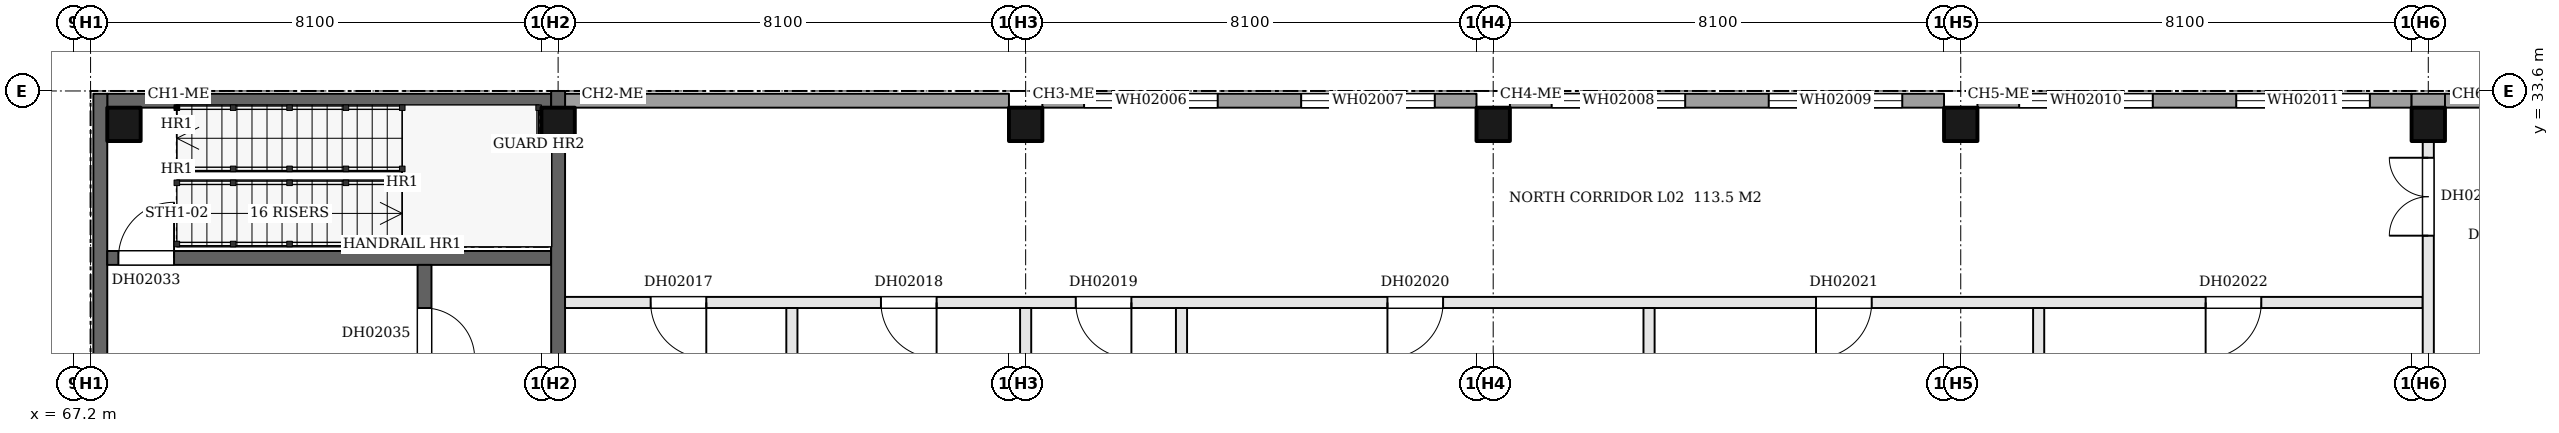
"""IFC4 building model, lengths in metres.
Left out: names, types, materials, properties, quantities, classifications, styles, units other than length and angle.
Written with IfcOpenShell. Run it as: python <this file> out.ifc"""

import sys

from ifc_helpers import new_model, si_unit, direction, frame, frame_2d, origin, origin_2d, place, context, subcontext, project, spatial, rectangle, extrude, element, fill, save


model = new_model("IFC4")
c1 = context("Model", 3, precision=1e-05, world=origin(), true_north=direction((0.0, 1.0)))
c2 = subcontext(c1, "Body", "Model", "MODEL_VIEW")
j1 = project(units=[si_unit("LENGTHUNIT", "METRE"), si_unit("PLANEANGLEUNIT", "RADIAN")], contexts=[c1])
p1 = place(None, origin())
s1 = spatial("IfcSite", under=j1, at=p1, CompositionType="ELEMENT")
p2 = place(p1, origin())
s2 = spatial("IfcBuilding", under=s1, at=p2, CompositionType="ELEMENT")
p3 = place(p2, frame((0.0, 0.0, 14.4)))
s3 = spatial("IfcBuildingStorey", under=s2, at=p3, CompositionType="ELEMENT", Elevation=14.4)
for number, where, z_axis, x_axis in (
    (1, (68.1, 33.0, 0.0), (0.0, 0.0, 1.0), (1.0, 0.0, 0.0)),
    (2, (75.9, 33.0, 0.0), (0.0, 0.0, 1.0), (1.0, 0.0, 0.0)),
    (3, (84.3, 33.0, 0.0), (0.0, 0.0, 1.0), (1.0, 0.0, 0.0)),
    (4, (92.7, 33.0, 0.0), (0.0, 0.0, 1.0), (1.0, 0.0, 0.0)),
    (5, (101.1, 33.0, 0.0), (0.0, 0.0, 1.0), (1.0, 0.0, 0.0)),
    (6, (109.5, 33.0, 0.0), (0.0, 0.0, 1.0), (1.0, 0.0, 0.0)),
):
    element("IfcColumn", number, at=place(p3, frame(where, z_axis=z_axis, x_axis=x_axis)), inside=s3, PredefinedType="COLUMN", context=c2, shape_type="SweptSolid", body=[
        extrude(rectangle(XDim=0.6, YDim=0.6, at=origin_2d()), origin(), (0.0, 0.0, 1.0), 5.1),
    ])
p4 = place(p3, frame((76.025, 29.8, 0.0), z_axis=(0.0, 0.0, 1.0), x_axis=(1.0, 0.0, 0.0)))
e7 = element("IfcWall", 7, at=p4, inside=s3, PredefinedType="PARTITIONING", context=c2, shape_type="SweptSolid", body=[
    extrude(rectangle(XDim=33.375, YDim=0.2, at=frame_2d((16.688, 0.0))), origin(), (0.0, 0.0, 1.0), 5.1),
])
p5 = place(p4, frame((1.538, 0.0, 0.0)))
e8 = element("IfcOpeningElement", 8, at=p5, cuts=e7, PredefinedType="OPENING", context=c2, shape_type="SweptSolid", body=[
    extrude(rectangle(XDim=1.0, YDim=2.1, at=frame_2d((0.5, 1.05))), frame((0.0, 0.11, 0.0), z_axis=(0.0, -1.0, 0.0), x_axis=(1.0, 0.0, 0.0)), (0.0, 0.0, 1.0), 0.22),
])
p6 = place(p4, frame((5.675, 0.0, 0.0)))
e9 = element("IfcOpeningElement", 9, at=p6, cuts=e7, PredefinedType="OPENING", context=c2, shape_type="SweptSolid", body=[
    extrude(rectangle(XDim=1.0, YDim=2.1, at=frame_2d((0.5, 1.05))), frame((0.0, 0.11, 0.0), z_axis=(0.0, -1.0, 0.0), x_axis=(1.0, 0.0, 0.0)), (0.0, 0.0, 1.0), 0.22),
])
p7 = place(p4, frame((9.175, 0.0, 0.0)))
e10 = element("IfcOpeningElement", 10, at=p7, cuts=e7, PredefinedType="OPENING", context=c2, shape_type="SweptSolid", body=[
    extrude(rectangle(XDim=1.0, YDim=2.1, at=frame_2d((0.5, 1.05))), frame((0.0, 0.11, 0.0), z_axis=(0.0, -1.0, 0.0), x_axis=(1.0, 0.0, 0.0)), (0.0, 0.0, 1.0), 0.22),
])
p8 = place(p4, frame((14.775, 0.0, 0.0)))
e11 = element("IfcOpeningElement", 11, at=p8, cuts=e7, PredefinedType="OPENING", context=c2, shape_type="SweptSolid", body=[
    extrude(rectangle(XDim=1.0, YDim=2.1, at=frame_2d((0.5, 1.05))), frame((0.0, 0.11, 0.0), z_axis=(0.0, -1.0, 0.0), x_axis=(1.0, 0.0, 0.0)), (0.0, 0.0, 1.0), 0.22),
])
p9 = place(p4, frame((22.475, 0.0, 0.0)))
e12 = element("IfcOpeningElement", 12, at=p9, cuts=e7, PredefinedType="OPENING", context=c2, shape_type="SweptSolid", body=[
    extrude(rectangle(XDim=1.0, YDim=2.1, at=frame_2d((0.5, 1.05))), frame((0.0, 0.11, 0.0), z_axis=(0.0, -1.0, 0.0), x_axis=(1.0, 0.0, 0.0)), (0.0, 0.0, 1.0), 0.22),
])
p10 = place(p4, frame((29.475, 0.0, 0.0)))
e13 = element("IfcOpeningElement", 13, at=p10, cuts=e7, PredefinedType="OPENING", context=c2, shape_type="SweptSolid", body=[
    extrude(rectangle(XDim=1.0, YDim=2.1, at=frame_2d((0.5, 1.05))), frame((0.0, 0.11, 0.0), z_axis=(0.0, -1.0, 0.0), x_axis=(1.0, 0.0, 0.0)), (0.0, 0.0, 1.0), 0.22),
])
p11 = place(p3, frame((67.8, 30.6, 0.0), z_axis=(0.0, 0.0, 1.0), x_axis=(1.0, 0.0, 0.0)))
e14 = element("IfcWall", 14, at=p11, inside=s3, PredefinedType="SHEAR", context=c2, shape_type="SweptSolid", body=[
    extrude(rectangle(XDim=7.975, YDim=0.25, at=frame_2d((3.987, 0.0))), origin(), (0.0, 0.0, 1.0), 5.1),
])
p12 = place(p11, frame((0.2, 0.0, 0.0)))
e15 = element("IfcOpeningElement", 15, at=p12, cuts=e14, PredefinedType="OPENING", context=c2, shape_type="SweptSolid", body=[
    extrude(rectangle(XDim=1.0, YDim=2.1, at=frame_2d((0.5, 1.05))), frame((0.0, 0.135, 0.0), z_axis=(0.0, -1.0, 0.0), x_axis=(1.0, 0.0, 0.0)), (0.0, 0.0, 1.0), 0.27),
])
p13 = place(p3, frame((67.8, 33.425, 0.0), z_axis=(0.0, 0.0, 1.0), x_axis=(1.0, 0.0, 0.0)))
e16 = element("IfcWall", 16, at=p13, inside=s3, PredefinedType="SHEAR", context=c2, shape_type="SweptSolid", body=[
    extrude(rectangle(XDim=7.975, YDim=0.25, at=frame_2d((3.987, 0.0))), origin(), (0.0, 0.0, 1.0), 5.1),
])
p14 = place(p3, frame((76.025, 33.425, 0.0), z_axis=(0.0, 0.0, 1.0), x_axis=(1.0, 0.0, 0.0)))
e17 = element("IfcWall", 17, at=p14, inside=s3, PredefinedType="SOLIDWALL", context=c2, shape_type="SweptSolid", body=[
    extrude(rectangle(XDim=7.975, YDim=0.25, at=frame_2d((3.988, 0.0))), origin(), (0.0, 0.0, 1.0), 5.1),
])
p15 = place(p3, frame((84.6, 33.425, 0.0), z_axis=(0.0, 0.0, 1.0), x_axis=(1.0, 0.0, 0.0)))
e18 = element("IfcWall", 18, at=p15, inside=s3, PredefinedType="SOLIDWALL", context=c2, shape_type="SweptSolid", body=[
    extrude(rectangle(XDim=7.8, YDim=0.25, at=frame_2d((3.9, 0.0))), origin(), (0.0, 0.0, 1.0), 5.1),
])
p16 = place(p15, frame((0.75, 0.0, 0.9)))
e19 = element("IfcOpeningElement", 19, at=p16, cuts=e18, PredefinedType="OPENING", context=c2, shape_type="SweptSolid", body=[
    extrude(rectangle(XDim=2.4, YDim=1.5, at=frame_2d((1.2, 0.75))), frame((0.0, 0.135, 0.0), z_axis=(0.0, -1.0, 0.0), x_axis=(1.0, 0.0, 0.0)), (0.0, 0.0, 1.0), 0.27),
])
p17 = place(p15, frame((4.65, 0.0, 0.9)))
e20 = element("IfcOpeningElement", 20, at=p17, cuts=e18, PredefinedType="OPENING", context=c2, shape_type="SweptSolid", body=[
    extrude(rectangle(XDim=2.4, YDim=1.5, at=frame_2d((1.2, 0.75))), frame((0.0, 0.135, 0.0), z_axis=(0.0, -1.0, 0.0), x_axis=(1.0, 0.0, 0.0)), (0.0, 0.0, 1.0), 0.27),
])
p18 = place(p3, frame((93.0, 33.425, 0.0), z_axis=(0.0, 0.0, 1.0), x_axis=(1.0, 0.0, 0.0)))
e21 = element("IfcWall", 21, at=p18, inside=s3, PredefinedType="SOLIDWALL", context=c2, shape_type="SweptSolid", body=[
    extrude(rectangle(XDim=7.8, YDim=0.25, at=frame_2d((3.9, 0.0))), origin(), (0.0, 0.0, 1.0), 5.1),
])
p19 = place(p18, frame((0.75, 0.0, 0.9)))
e22 = element("IfcOpeningElement", 22, at=p19, cuts=e21, PredefinedType="OPENING", context=c2, shape_type="SweptSolid", body=[
    extrude(rectangle(XDim=2.4, YDim=1.5, at=frame_2d((1.2, 0.75))), frame((0.0, 0.135, 0.0), z_axis=(0.0, -1.0, 0.0), x_axis=(1.0, 0.0, 0.0)), (0.0, 0.0, 1.0), 0.27),
])
p20 = place(p18, frame((4.65, 0.0, 0.9)))
e23 = element("IfcOpeningElement", 23, at=p20, cuts=e21, PredefinedType="OPENING", context=c2, shape_type="SweptSolid", body=[
    extrude(rectangle(XDim=2.4, YDim=1.5, at=frame_2d((1.2, 0.75))), frame((0.0, 0.135, 0.0), z_axis=(0.0, -1.0, 0.0), x_axis=(1.0, 0.0, 0.0)), (0.0, 0.0, 1.0), 0.27),
])
p21 = place(p3, frame((101.4, 33.425, 0.0), z_axis=(0.0, 0.0, 1.0), x_axis=(1.0, 0.0, 0.0)))
e24 = element("IfcWall", 24, at=p21, inside=s3, PredefinedType="SOLIDWALL", context=c2, shape_type="SweptSolid", body=[
    extrude(rectangle(XDim=7.8, YDim=0.25, at=frame_2d((3.9, 0.0))), origin(), (0.0, 0.0, 1.0), 5.1),
])
p22 = place(p21, frame((0.75, 0.0, 0.9)))
e25 = element("IfcOpeningElement", 25, at=p22, cuts=e24, PredefinedType="OPENING", context=c2, shape_type="SweptSolid", body=[
    extrude(rectangle(XDim=2.4, YDim=1.5, at=frame_2d((1.2, 0.75))), frame((0.0, 0.135, 0.0), z_axis=(0.0, -1.0, 0.0), x_axis=(1.0, 0.0, 0.0)), (0.0, 0.0, 1.0), 0.27),
])
p23 = place(p21, frame((4.65, 0.0, 0.9)))
e26 = element("IfcOpeningElement", 26, at=p23, cuts=e24, PredefinedType="OPENING", context=c2, shape_type="SweptSolid", body=[
    extrude(rectangle(XDim=2.4, YDim=1.5, at=frame_2d((1.2, 0.75))), frame((0.0, 0.135, 0.0), z_axis=(0.0, -1.0, 0.0), x_axis=(1.0, 0.0, 0.0)), (0.0, 0.0, 1.0), 0.27),
])
p24 = place(p3, frame((109.2, 33.425, 0.0), z_axis=(0.0, 0.0, 1.0), x_axis=(1.0, 0.0, 0.0)))
e27 = element("IfcWall", 27, at=p24, inside=s3, PredefinedType="SOLIDWALL", context=c2, shape_type="SweptSolid", body=[
    extrude(rectangle(XDim=0.6, YDim=0.25, at=frame_2d((0.3, 0.0))), origin(), (0.0, 0.0, 1.0), 5.1),
])
p25 = place(p3, frame((109.8, 33.425, 0.0), z_axis=(0.0, 0.0, 1.0), x_axis=(1.0, 0.0, 0.0)))
e28 = element("IfcWall", 28, at=p25, inside=s3, PredefinedType="SOLIDWALL", context=c2, shape_type="SweptSolid", body=[
    extrude(rectangle(XDim=1.775, YDim=0.25, at=frame_2d((0.887, 0.0))), origin(), (0.0, 0.0, 1.0), 5.1),
])
p26 = place(p3, frame((67.675, 25.325, 0.0), z_axis=(0.0, 0.0, 1.0), x_axis=(0.0, 1.0, 0.0)))
e29 = element("IfcWall", 29, at=p26, inside=s3, PredefinedType="SHEAR", context=c2, shape_type="SweptSolid", body=[
    extrude(rectangle(XDim=8.225, YDim=0.25, at=frame_2d((4.113, 0.0))), origin(), (0.0, 0.0, 1.0), 5.1),
])
p27 = place(p3, frame((73.5, 25.325, 0.0), z_axis=(0.0, 0.0, 1.0), x_axis=(0.0, 1.0, 0.0)))
e30 = element("IfcWall", 30, at=p27, inside=s3, PredefinedType="SHEAR", context=c2, shape_type="SweptSolid", body=[
    extrude(rectangle(XDim=5.15, YDim=0.25, at=frame_2d((2.575, 0.0))), origin(), (0.0, 0.0, 1.0), 5.1),
])
p28 = place(p27, frame((0.675, 0.0, 0.0)))
e31 = element("IfcOpeningElement", 31, at=p28, cuts=e30, PredefinedType="OPENING", context=c2, shape_type="SweptSolid", body=[
    extrude(rectangle(XDim=1.1, YDim=2.1, at=frame_2d((0.55, 1.05))), frame((0.0, 0.135, 0.0), z_axis=(0.0, -1.0, 0.0), x_axis=(1.0, 0.0, 0.0)), (0.0, 0.0, 1.0), 0.27),
])
p29 = place(p27, frame((3.475, 0.0, 0.0)))
e32 = element("IfcOpeningElement", 32, at=p29, cuts=e30, PredefinedType="OPENING", context=c2, shape_type="SweptSolid", body=[
    extrude(rectangle(XDim=0.9, YDim=2.1, at=frame_2d((0.45, 1.05))), frame((0.0, 0.135, 0.0), z_axis=(0.0, -1.0, 0.0), x_axis=(1.0, 0.0, 0.0)), (0.0, 0.0, 1.0), 0.27),
])
p30 = place(p3, frame((75.9, 25.5, 0.0), z_axis=(0.0, 0.0, 1.0), x_axis=(0.0, 1.0, 0.0)))
e33 = element("IfcWall", 33, at=p30, inside=s3, PredefinedType="SHEAR", context=c2, shape_type="SweptSolid", body=[
    extrude(rectangle(XDim=7.2, YDim=0.25, at=frame_2d((3.6, 0.0))), origin(), (0.0, 0.0, 1.0), 5.1),
])
p31 = place(p3, frame((75.9, 33.3, 0.0), z_axis=(0.0, 0.0, 1.0), x_axis=(0.0, 1.0, 0.0)))
e34 = element("IfcWall", 34, at=p31, inside=s3, PredefinedType="SHEAR", context=c2, shape_type="SweptSolid", body=[
    extrude(rectangle(XDim=0.3, YDim=0.25, at=frame_2d((0.15, 0.0))), origin(), (0.0, 0.0, 1.0), 5.1),
])
p32 = place(p3, frame((80.1, 25.3, 0.0), z_axis=(0.0, 0.0, 1.0), x_axis=(0.0, 1.0, 0.0)))
e35 = element("IfcWall", 35, at=p32, inside=s3, PredefinedType="PARTITIONING", context=c2, shape_type="SweptSolid", body=[
    extrude(rectangle(XDim=4.4, YDim=0.2, at=frame_2d((2.2, 0.0))), origin(), (0.0, 0.0, 1.0), 5.1),
])
p33 = place(p3, frame((84.3, 25.5, 0.0), z_axis=(0.0, 0.0, 1.0), x_axis=(0.0, 1.0, 0.0)))
e36 = element("IfcWall", 36, at=p33, inside=s3, PredefinedType="PARTITIONING", context=c2, shape_type="SweptSolid", body=[
    extrude(rectangle(XDim=4.2, YDim=0.2, at=frame_2d((2.1, 0.0))), origin(), (0.0, 0.0, 1.0), 5.1),
])
for number, where, z_axis, x_axis in (
    (37, (87.1, 25.3, 0.0), (0.0, 0.0, 1.0), (0.0, 1.0, 0.0)),
    (38, (95.5, 25.3, 0.0), (0.0, 0.0, 1.0), (0.0, 1.0, 0.0)),
    (39, (102.5, 25.3, 0.0), (0.0, 0.0, 1.0), (0.0, 1.0, 0.0)),
):
    element("IfcWall", number, at=place(p3, frame(where, z_axis=z_axis, x_axis=x_axis)), inside=s3, PredefinedType="PARTITIONING", context=c2, shape_type="SweptSolid", body=[
        extrude(rectangle(XDim=4.4, YDim=0.2, at=frame_2d((2.2, 0.0))), origin(), (0.0, 0.0, 1.0), 5.1),
    ])
p34 = place(p3, frame((109.5, 25.5, 0.0), z_axis=(0.0, 0.0, 1.0), x_axis=(0.0, 1.0, 0.0)))
e40 = element("IfcWall", 40, at=p34, inside=s3, PredefinedType="PARTITIONING", context=c2, shape_type="SweptSolid", body=[
    extrude(rectangle(XDim=7.2, YDim=0.2, at=frame_2d((3.6, 0.0))), origin(), (0.0, 0.0, 1.0), 5.1),
])
p35 = place(p34, frame((5.5, 0.0, 0.0)))
e41 = element("IfcOpeningElement", 41, at=p35, cuts=e40, PredefinedType="OPENING", context=c2, shape_type="SweptSolid", body=[
    extrude(rectangle(XDim=1.4, YDim=2.1, at=frame_2d((0.7, 1.05))), frame((0.0, 0.11, 0.0), z_axis=(0.0, -1.0, 0.0), x_axis=(1.0, 0.0, 0.0)), (0.0, 0.0, 1.0), 0.22),
])
p36 = place(p5, frame((1.0, 0.0, 0.0), z_axis=(0.0, 0.0, 1.0), x_axis=(-1.0, 0.0, 0.0)))
e42 = element("IfcDoor", 42, at=p36, inside=s3, OperationType="SINGLE_SWING_LEFT", PredefinedType="DOOR", context=c2, shape_type="SweptSolid", body=[
    extrude(rectangle(XDim=1.0, YDim=2.1, at=frame_2d((0.5, 1.05))), frame((0.0, 0.025, 0.0), z_axis=(0.0, -1.0, 0.0), x_axis=(1.0, 0.0, 0.0)), (0.0, 0.0, 1.0), 0.05),
])
fill(e8, e42)
p37 = place(p6, frame((1.0, 0.0, 0.0), z_axis=(0.0, 0.0, 1.0), x_axis=(-1.0, 0.0, 0.0)))
e43 = element("IfcDoor", 43, at=p37, inside=s3, OperationType="SINGLE_SWING_LEFT", PredefinedType="DOOR", context=c2, shape_type="SweptSolid", body=[
    extrude(rectangle(XDim=1.0, YDim=2.1, at=frame_2d((0.5, 1.05))), frame((0.0, 0.025, 0.0), z_axis=(0.0, -1.0, 0.0), x_axis=(1.0, 0.0, 0.0)), (0.0, 0.0, 1.0), 0.05),
])
fill(e9, e43)
p38 = place(p7, frame((1.0, 0.0, 0.0), z_axis=(0.0, 0.0, 1.0), x_axis=(-1.0, 0.0, 0.0)))
e44 = element("IfcDoor", 44, at=p38, inside=s3, OperationType="SINGLE_SWING_LEFT", PredefinedType="DOOR", context=c2, shape_type="SweptSolid", body=[
    extrude(rectangle(XDim=1.0, YDim=2.1, at=frame_2d((0.5, 1.05))), frame((0.0, 0.025, 0.0), z_axis=(0.0, -1.0, 0.0), x_axis=(1.0, 0.0, 0.0)), (0.0, 0.0, 1.0), 0.05),
])
fill(e10, e44)
p39 = place(p8, frame((1.0, 0.0, 0.0), z_axis=(0.0, 0.0, 1.0), x_axis=(-1.0, 0.0, 0.0)))
e45 = element("IfcDoor", 45, at=p39, inside=s3, OperationType="SINGLE_SWING_RIGHT", PredefinedType="DOOR", context=c2, shape_type="SweptSolid", body=[
    extrude(rectangle(XDim=1.0, YDim=2.1, at=frame_2d((0.5, 1.05))), frame((0.0, 0.025, 0.0), z_axis=(0.0, -1.0, 0.0), x_axis=(1.0, 0.0, 0.0)), (0.0, 0.0, 1.0), 0.05),
])
fill(e11, e45)
p40 = place(p9, frame((1.0, 0.0, 0.0), z_axis=(0.0, 0.0, 1.0), x_axis=(-1.0, 0.0, 0.0)))
e46 = element("IfcDoor", 46, at=p40, inside=s3, OperationType="SINGLE_SWING_RIGHT", PredefinedType="DOOR", context=c2, shape_type="SweptSolid", body=[
    extrude(rectangle(XDim=1.0, YDim=2.1, at=frame_2d((0.5, 1.05))), frame((0.0, 0.025, 0.0), z_axis=(0.0, -1.0, 0.0), x_axis=(1.0, 0.0, 0.0)), (0.0, 0.0, 1.0), 0.05),
])
fill(e12, e46)
p41 = place(p10, frame((1.0, 0.0, 0.0), z_axis=(0.0, 0.0, 1.0), x_axis=(-1.0, 0.0, 0.0)))
e47 = element("IfcDoor", 47, at=p41, inside=s3, OperationType="SINGLE_SWING_RIGHT", PredefinedType="DOOR", context=c2, shape_type="SweptSolid", body=[
    extrude(rectangle(XDim=1.0, YDim=2.1, at=frame_2d((0.5, 1.05))), frame((0.0, 0.025, 0.0), z_axis=(0.0, -1.0, 0.0), x_axis=(1.0, 0.0, 0.0)), (0.0, 0.0, 1.0), 0.05),
])
fill(e13, e47)
p42 = place(p35, origin())
e48 = element("IfcDoor", 48, at=p42, inside=s3, OperationType="DOUBLE_DOOR_SINGLE_SWING", PredefinedType="DOOR", context=c2, shape_type="SweptSolid", body=[
    extrude(rectangle(XDim=1.4, YDim=2.1, at=frame_2d((0.7, 1.05))), frame((0.0, 0.025, 0.0), z_axis=(0.0, -1.0, 0.0), x_axis=(1.0, 0.0, 0.0)), (0.0, 0.0, 1.0), 0.05),
])
fill(e41, e48)
p43 = place(p12, origin())
e49 = element("IfcDoor", 49, at=p43, inside=s3, OperationType="SINGLE_SWING_RIGHT", PredefinedType="DOOR", context=c2, shape_type="SweptSolid", body=[
    extrude(rectangle(XDim=1.0, YDim=2.1, at=frame_2d((0.5, 1.05))), frame((0.0, 0.025, 0.0), z_axis=(0.0, -1.0, 0.0), x_axis=(1.0, 0.0, 0.0)), (0.0, 0.0, 1.0), 0.05),
])
fill(e15, e49)
p44 = place(p29, frame((0.9, 0.0, 0.0), z_axis=(0.0, 0.0, 1.0), x_axis=(-1.0, 0.0, 0.0)))
e50 = element("IfcDoor", 50, at=p44, inside=s3, OperationType="SINGLE_SWING_RIGHT", PredefinedType="DOOR", context=c2, shape_type="SweptSolid", body=[
    extrude(rectangle(XDim=0.9, YDim=2.1, at=frame_2d((0.45, 1.05))), frame((0.0, 0.025, 0.0), z_axis=(0.0, -1.0, 0.0), x_axis=(1.0, 0.0, 0.0)), (0.0, 0.0, 1.0), 0.05),
])
fill(e32, e50)
p45 = place(p16, origin())
e51 = element("IfcWindow", 51, at=p45, inside=s3, PartitioningType="DOUBLE_PANEL_VERTICAL", PredefinedType="WINDOW", context=c2, shape_type="SweptSolid", body=[
    extrude(rectangle(XDim=2.4, YDim=1.5, at=frame_2d((1.2, 0.75))), frame((0.0, 0.03, 0.0), z_axis=(0.0, -1.0, 0.0), x_axis=(1.0, 0.0, 0.0)), (0.0, 0.0, 1.0), 0.06),
])
fill(e19, e51)
p46 = place(p17, origin())
e52 = element("IfcWindow", 52, at=p46, inside=s3, PartitioningType="DOUBLE_PANEL_VERTICAL", PredefinedType="WINDOW", context=c2, shape_type="SweptSolid", body=[
    extrude(rectangle(XDim=2.4, YDim=1.5, at=frame_2d((1.2, 0.75))), frame((0.0, 0.03, 0.0), z_axis=(0.0, -1.0, 0.0), x_axis=(1.0, 0.0, 0.0)), (0.0, 0.0, 1.0), 0.06),
])
fill(e20, e52)
p47 = place(p19, origin())
e53 = element("IfcWindow", 53, at=p47, inside=s3, PartitioningType="DOUBLE_PANEL_VERTICAL", PredefinedType="WINDOW", context=c2, shape_type="SweptSolid", body=[
    extrude(rectangle(XDim=2.4, YDim=1.5, at=frame_2d((1.2, 0.75))), frame((0.0, 0.03, 0.0), z_axis=(0.0, -1.0, 0.0), x_axis=(1.0, 0.0, 0.0)), (0.0, 0.0, 1.0), 0.06),
])
fill(e22, e53)
p48 = place(p20, origin())
e54 = element("IfcWindow", 54, at=p48, inside=s3, PartitioningType="DOUBLE_PANEL_VERTICAL", PredefinedType="WINDOW", context=c2, shape_type="SweptSolid", body=[
    extrude(rectangle(XDim=2.4, YDim=1.5, at=frame_2d((1.2, 0.75))), frame((0.0, 0.03, 0.0), z_axis=(0.0, -1.0, 0.0), x_axis=(1.0, 0.0, 0.0)), (0.0, 0.0, 1.0), 0.06),
])
fill(e23, e54)
p49 = place(p22, origin())
e55 = element("IfcWindow", 55, at=p49, inside=s3, PartitioningType="DOUBLE_PANEL_VERTICAL", PredefinedType="WINDOW", context=c2, shape_type="SweptSolid", body=[
    extrude(rectangle(XDim=2.4, YDim=1.5, at=frame_2d((1.2, 0.75))), frame((0.0, 0.03, 0.0), z_axis=(0.0, -1.0, 0.0), x_axis=(1.0, 0.0, 0.0)), (0.0, 0.0, 1.0), 0.06),
])
fill(e25, e55)
p50 = place(p23, origin())
e56 = element("IfcWindow", 56, at=p50, inside=s3, PartitioningType="DOUBLE_PANEL_VERTICAL", PredefinedType="WINDOW", context=c2, shape_type="SweptSolid", body=[
    extrude(rectangle(XDim=2.4, YDim=1.5, at=frame_2d((1.2, 0.75))), frame((0.0, 0.03, 0.0), z_axis=(0.0, -1.0, 0.0), x_axis=(1.0, 0.0, 0.0)), (0.0, 0.0, 1.0), 0.06),
])
fill(e26, e56)
save(model, sys.argv[1])
